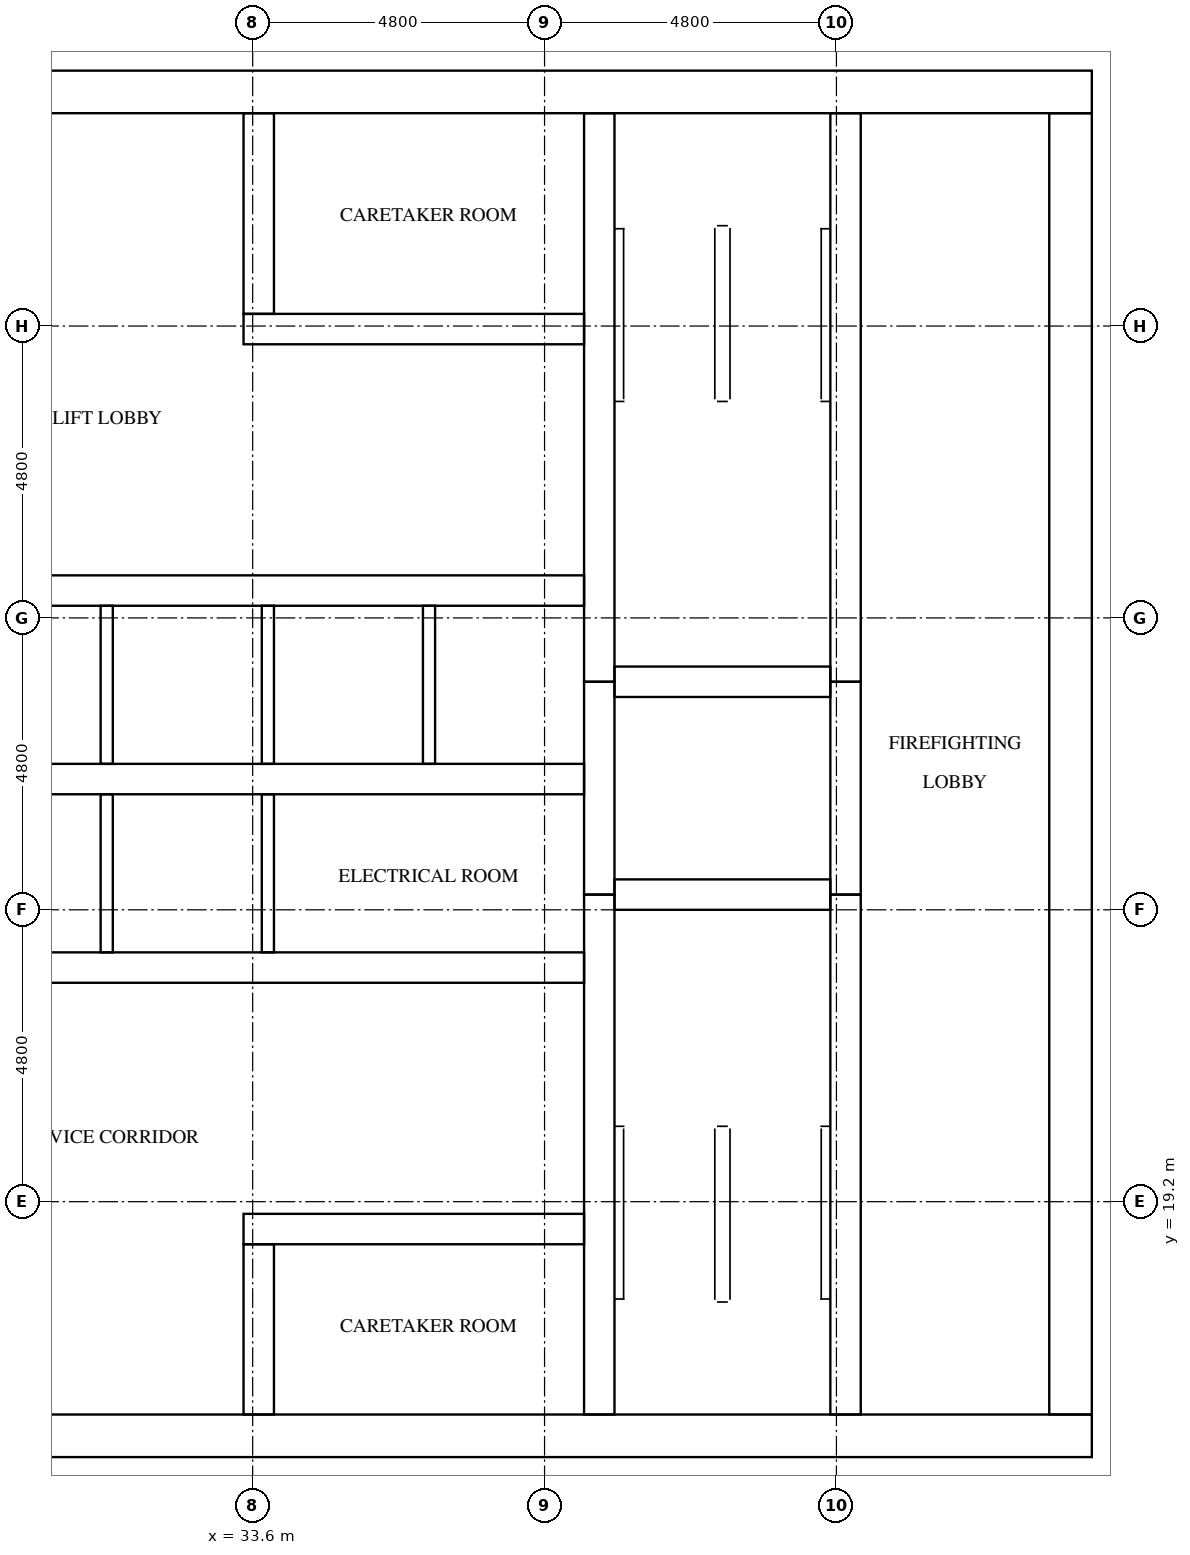
"""IFC4 building model, lengths in metres.
Left out: names, types, materials, properties, quantities, classifications, styles, units other than length and angle.
Written with IfcOpenShell. Run it as: python <this file> out.ifc"""

import sys

from ifc_helpers import new_model, si_unit, direction, frame, frame_2d, origin, place, context, subcontext, project, spatial, rectangle, extrude, element, fill, save


model = new_model("IFC4")
c1 = context("Model", 3, precision=1e-05, world=origin(), true_north=direction((0.0, 1.0)))
c2 = subcontext(c1, "Body", "Model", "MODEL_VIEW")
j1 = project(units=[si_unit("LENGTHUNIT", "METRE"), si_unit("PLANEANGLEUNIT", "RADIAN")], contexts=[c1])
p1 = place(None, origin())
s1 = spatial("IfcSite", under=j1, at=p1, CompositionType="ELEMENT")
p2 = place(p1, origin())
s2 = spatial("IfcBuilding", under=s1, at=p2, CompositionType="ELEMENT")
p3 = place(p2, frame((0.0, 0.0, 208.8)))
s3 = spatial("IfcBuildingStorey", under=s2, at=p3, CompositionType="ELEMENT", Elevation=208.8)
p4 = place(p3, frame((15.0, 15.35, 0.0), z_axis=(0.0, 0.0, 1.0), x_axis=(1.0, 0.0, 0.0)))
e1 = element("IfcWall", 1, at=p4, inside=s3, PredefinedType="SHEAR", context=c2, shape_type="SweptSolid", body=[
    extrude(rectangle(XDim=32.4, YDim=0.7, at=frame_2d((16.2, 0.0))), origin(), (0.0, 0.0, 1.0), 3.2),
])
p5 = place(p4, frame((15.3, 0.0, 0.0)))
e2 = element("IfcOpeningElement", 2, at=p5, cuts=e1, PredefinedType="OPENING", context=c2, shape_type="SweptSolid", body=[
    extrude(rectangle(XDim=1.8, YDim=2.1, at=frame_2d((0.9, 1.05))), frame((0.0, 0.36, 0.0), z_axis=(0.0, -1.0, 0.0), x_axis=(1.0, 0.0, 0.0)), (0.0, 0.0, 1.0), 0.72),
])
p6 = place(p3, frame((15.0, 37.45, 0.0), z_axis=(0.0, 0.0, 1.0), x_axis=(1.0, 0.0, 0.0)))
e3 = element("IfcWall", 3, at=p6, inside=s3, PredefinedType="SHEAR", context=c2, shape_type="SweptSolid", body=[
    extrude(rectangle(XDim=32.4, YDim=0.7, at=frame_2d((16.2, 0.0))), origin(), (0.0, 0.0, 1.0), 3.2),
])
p7 = place(p6, frame((15.3, 0.0, 0.0)))
e4 = element("IfcOpeningElement", 4, at=p7, cuts=e3, PredefinedType="OPENING", context=c2, shape_type="SweptSolid", body=[
    extrude(rectangle(XDim=1.8, YDim=2.1, at=frame_2d((0.9, 1.05))), frame((0.0, 0.36, 0.0), z_axis=(0.0, -1.0, 0.0), x_axis=(1.0, 0.0, 0.0)), (0.0, 0.0, 1.0), 0.72),
])
p8 = place(p6, frame((1.544, 0.0, 0.0)))
e5 = element("IfcOpeningElement", 5, at=p8, cuts=e3, PredefinedType="OPENING", context=c2, shape_type="SweptSolid", body=[
    extrude(rectangle(XDim=1.0, YDim=2.1, at=frame_2d((0.5, 1.05))), frame((0.0, 0.36, 0.0), z_axis=(0.0, -1.0, 0.0), x_axis=(1.0, 0.0, 0.0)), (0.0, 0.0, 1.0), 0.72),
])
p9 = place(p6, frame((5.219, 0.0, 0.0)))
e6 = element("IfcOpeningElement", 6, at=p9, cuts=e3, PredefinedType="OPENING", context=c2, shape_type="SweptSolid", body=[
    extrude(rectangle(XDim=1.0, YDim=2.1, at=frame_2d((0.5, 1.05))), frame((0.0, 0.36, 0.0), z_axis=(0.0, -1.0, 0.0), x_axis=(1.0, 0.0, 0.0)), (0.0, 0.0, 1.0), 0.72),
])
p10 = place(p3, frame((47.05, 15.7, 0.0), z_axis=(0.0, 0.0, 1.0), x_axis=(0.0, 1.0, 0.0)))
e7 = element("IfcWall", 7, at=p10, inside=s3, PredefinedType="SHEAR", context=c2, shape_type="SweptSolid", body=[
    extrude(rectangle(XDim=21.4, YDim=0.7, at=frame_2d((10.7, 0.0))), origin(), (0.0, 0.0, 1.0), 3.2),
])
p11 = place(p10, frame((10.4, 0.0, 0.0)))
e8 = element("IfcOpeningElement", 8, at=p11, cuts=e7, PredefinedType="OPENING", context=c2, shape_type="SweptSolid", body=[
    extrude(rectangle(XDim=1.2, YDim=2.1, at=frame_2d((0.6, 1.05))), frame((0.0, 0.36, 0.0), z_axis=(0.0, -1.0, 0.0), x_axis=(1.0, 0.0, 0.0)), (0.0, 0.0, 1.0), 0.72),
])
p12 = place(p3, frame((39.3, 15.7, 0.0), z_axis=(0.0, 0.0, 1.0), x_axis=(0.0, 1.0, 0.0)))
e9 = element("IfcWall", 9, at=p12, inside=s3, PredefinedType="SHEAR", context=c2, shape_type="SweptSolid", body=[
    extrude(rectangle(XDim=8.55, YDim=0.5, at=frame_2d((4.275, 0.0))), origin(), (0.0, 0.0, 1.0), 3.2),
])
p13 = place(p3, frame((39.3, 24.25, 0.0), z_axis=(0.0, 0.0, 1.0), x_axis=(0.0, 1.0, 0.0)))
e10 = element("IfcWall", 10, at=p13, inside=s3, PredefinedType="SHEAR", context=c2, shape_type="SweptSolid", body=[
    extrude(rectangle(XDim=3.5, YDim=0.5, at=frame_2d((1.75, 0.0))), origin(), (0.0, 0.0, 1.0), 3.2),
])
p14 = place(p3, frame((39.3, 27.75, 0.0), z_axis=(0.0, 0.0, 1.0), x_axis=(0.0, 1.0, 0.0)))
e11 = element("IfcWall", 11, at=p14, inside=s3, PredefinedType="SHEAR", context=c2, shape_type="SweptSolid", body=[
    extrude(rectangle(XDim=9.35, YDim=0.5, at=frame_2d((4.675, 0.0))), origin(), (0.0, 0.0, 1.0), 3.2),
])
p15 = place(p3, frame((43.35, 15.7, 0.0), z_axis=(0.0, 0.0, 1.0), x_axis=(0.0, 1.0, 0.0)))
e12 = element("IfcWall", 12, at=p15, inside=s3, PredefinedType="SHEAR", context=c2, shape_type="SweptSolid", body=[
    extrude(rectangle(XDim=8.55, YDim=0.5, at=frame_2d((4.275, 0.0))), origin(), (0.0, 0.0, 1.0), 3.2),
])
p16 = place(p15, frame((0.5, 0.0, 0.0)))
e13 = element("IfcOpeningElement", 13, at=p16, cuts=e12, PredefinedType="OPENING", context=c2, shape_type="SweptSolid", body=[
    extrude(rectangle(XDim=1.2, YDim=2.1, at=frame_2d((0.6, 1.05))), frame((0.0, 0.26, 0.0), z_axis=(0.0, -1.0, 0.0), x_axis=(1.0, 0.0, 0.0)), (0.0, 0.0, 1.0), 0.52),
])
p17 = place(p3, frame((43.35, 24.25, 0.0), z_axis=(0.0, 0.0, 1.0), x_axis=(0.0, 1.0, 0.0)))
e14 = element("IfcWall", 14, at=p17, inside=s3, PredefinedType="SHEAR", context=c2, shape_type="SweptSolid", body=[
    extrude(rectangle(XDim=3.5, YDim=0.5, at=frame_2d((1.75, 0.0))), origin(), (0.0, 0.0, 1.0), 3.2),
])
p18 = place(p17, frame((1.2, 0.0, 0.0)))
e15 = element("IfcOpeningElement", 15, at=p18, cuts=e14, PredefinedType="OPENING", context=c2, shape_type="SweptSolid", body=[
    extrude(rectangle(XDim=1.1, YDim=2.1, at=frame_2d((0.55, 1.05))), frame((0.0, 0.26, 0.0), z_axis=(0.0, -1.0, 0.0), x_axis=(1.0, 0.0, 0.0)), (0.0, 0.0, 1.0), 0.52),
])
p19 = place(p3, frame((43.35, 27.75, 0.0), z_axis=(0.0, 0.0, 1.0), x_axis=(0.0, 1.0, 0.0)))
e16 = element("IfcWall", 16, at=p19, inside=s3, PredefinedType="SHEAR", context=c2, shape_type="SweptSolid", body=[
    extrude(rectangle(XDim=9.35, YDim=0.5, at=frame_2d((4.675, 0.0))), origin(), (0.0, 0.0, 1.0), 3.2),
])
p20 = place(p19, frame((7.65, 0.0, 0.0)))
e17 = element("IfcOpeningElement", 17, at=p20, cuts=e16, PredefinedType="OPENING", context=c2, shape_type="SweptSolid", body=[
    extrude(rectangle(XDim=1.2, YDim=2.1, at=frame_2d((0.6, 1.05))), frame((0.0, 0.26, 0.0), z_axis=(0.0, -1.0, 0.0), x_axis=(1.0, 0.0, 0.0)), (0.0, 0.0, 1.0), 0.52),
])
for number, where, z_axis, x_axis in (
    (18, (39.55, 24.25, 0.0), (0.0, 0.0, 1.0), (1.0, 0.0, 0.0)),
    (19, (39.55, 27.75, 0.0), (0.0, 0.0, 1.0), (1.0, 0.0, 0.0)),
):
    element("IfcWall", number, at=place(p3, frame(where, z_axis=z_axis, x_axis=x_axis)), inside=s3, PredefinedType="SHEAR", context=c2, shape_type="SweptSolid", body=[
        extrude(rectangle(XDim=3.55, YDim=0.5, at=frame_2d((1.775, 0.0))), origin(), (0.0, 0.0, 1.0), 3.2),
    ])
p21 = place(p3, frame((33.45, 18.75, 0.0), z_axis=(0.0, 0.0, 1.0), x_axis=(1.0, 0.0, 0.0)))
e20 = element("IfcWall", 20, at=p21, inside=s3, PredefinedType="SHEAR", context=c2, shape_type="SweptSolid", body=[
    extrude(rectangle(XDim=5.6, YDim=0.5, at=frame_2d((2.8, 0.0))), origin(), (0.0, 0.0, 1.0), 3.2),
])
p22 = place(p21, frame((2.55, 0.0, 0.0)))
e21 = element("IfcOpeningElement", 21, at=p22, cuts=e20, PredefinedType="OPENING", context=c2, shape_type="SweptSolid", body=[
    extrude(rectangle(XDim=1.0, YDim=2.1, at=frame_2d((0.5, 1.05))), frame((0.0, 0.26, 0.0), z_axis=(0.0, -1.0, 0.0), x_axis=(1.0, 0.0, 0.0)), (0.0, 0.0, 1.0), 0.52),
])
p23 = place(p3, frame((23.35, 23.05, 0.0), z_axis=(0.0, 0.0, 1.0), x_axis=(1.0, 0.0, 0.0)))
e22 = element("IfcWall", 22, at=p23, inside=s3, PredefinedType="SHEAR", context=c2, shape_type="SweptSolid", body=[
    extrude(rectangle(XDim=15.7, YDim=0.5, at=frame_2d((7.85, 0.0))), origin(), (0.0, 0.0, 1.0), 3.2),
])
p24 = place(p23, frame((2.05, 0.0, 0.0)))
e23 = element("IfcOpeningElement", 23, at=p24, cuts=e22, PredefinedType="OPENING", context=c2, shape_type="SweptSolid", body=[
    extrude(rectangle(XDim=1.0, YDim=2.1, at=frame_2d((0.5, 1.05))), frame((0.0, 0.26, 0.0), z_axis=(0.0, -1.0, 0.0), x_axis=(1.0, 0.0, 0.0)), (0.0, 0.0, 1.0), 0.52),
])
p25 = place(p23, frame((12.65, 0.0, 0.0)))
e24 = element("IfcOpeningElement", 24, at=p25, cuts=e22, PredefinedType="OPENING", context=c2, shape_type="SweptSolid", body=[
    extrude(rectangle(XDim=1.0, YDim=2.1, at=frame_2d((0.5, 1.05))), frame((0.0, 0.26, 0.0), z_axis=(0.0, -1.0, 0.0), x_axis=(1.0, 0.0, 0.0)), (0.0, 0.0, 1.0), 0.52),
])
p26 = place(p3, frame((23.35, 26.15, 0.0), z_axis=(0.0, 0.0, 1.0), x_axis=(1.0, 0.0, 0.0)))
e25 = element("IfcWall", 25, at=p26, inside=s3, PredefinedType="SHEAR", context=c2, shape_type="SweptSolid", body=[
    extrude(rectangle(XDim=15.7, YDim=0.5, at=frame_2d((7.85, 0.0))), origin(), (0.0, 0.0, 1.0), 3.2),
])
p27 = place(p3, frame((23.35, 29.25, 0.0), z_axis=(0.0, 0.0, 1.0), x_axis=(1.0, 0.0, 0.0)))
e26 = element("IfcWall", 26, at=p27, inside=s3, PredefinedType="SHEAR", context=c2, shape_type="SweptSolid", body=[
    extrude(rectangle(XDim=15.7, YDim=0.5, at=frame_2d((7.85, 0.0))), origin(), (0.0, 0.0, 1.0), 3.2),
])
p28 = place(p27, frame((0.675, 0.0, 0.0)))
e27 = element("IfcOpeningElement", 27, at=p28, cuts=e26, PredefinedType="OPENING", context=c2, shape_type="SweptSolid", body=[
    extrude(rectangle(XDim=1.1, YDim=2.1, at=frame_2d((0.55, 1.05))), frame((0.0, 0.26, 0.0), z_axis=(0.0, -1.0, 0.0), x_axis=(1.0, 0.0, 0.0)), (0.0, 0.0, 1.0), 0.52),
])
p29 = place(p27, frame((3.325, 0.0, 0.0)))
e28 = element("IfcOpeningElement", 28, at=p29, cuts=e26, PredefinedType="OPENING", context=c2, shape_type="SweptSolid", body=[
    extrude(rectangle(XDim=1.1, YDim=2.1, at=frame_2d((0.55, 1.05))), frame((0.0, 0.26, 0.0), z_axis=(0.0, -1.0, 0.0), x_axis=(1.0, 0.0, 0.0)), (0.0, 0.0, 1.0), 0.52),
])
p30 = place(p27, frame((5.975, 0.0, 0.0)))
e29 = element("IfcOpeningElement", 29, at=p30, cuts=e26, PredefinedType="OPENING", context=c2, shape_type="SweptSolid", body=[
    extrude(rectangle(XDim=1.1, YDim=2.1, at=frame_2d((0.55, 1.05))), frame((0.0, 0.26, 0.0), z_axis=(0.0, -1.0, 0.0), x_axis=(1.0, 0.0, 0.0)), (0.0, 0.0, 1.0), 0.52),
])
p31 = place(p27, frame((8.625, 0.0, 0.0)))
e30 = element("IfcOpeningElement", 30, at=p31, cuts=e26, PredefinedType="OPENING", context=c2, shape_type="SweptSolid", body=[
    extrude(rectangle(XDim=1.1, YDim=2.1, at=frame_2d((0.55, 1.05))), frame((0.0, 0.26, 0.0), z_axis=(0.0, -1.0, 0.0), x_axis=(1.0, 0.0, 0.0)), (0.0, 0.0, 1.0), 0.52),
])
p32 = place(p27, frame((11.275, 0.0, 0.0)))
e31 = element("IfcOpeningElement", 31, at=p32, cuts=e26, PredefinedType="OPENING", context=c2, shape_type="SweptSolid", body=[
    extrude(rectangle(XDim=1.1, YDim=2.1, at=frame_2d((0.55, 1.05))), frame((0.0, 0.26, 0.0), z_axis=(0.0, -1.0, 0.0), x_axis=(1.0, 0.0, 0.0)), (0.0, 0.0, 1.0), 0.52),
])
p33 = place(p27, frame((13.925, 0.0, 0.0)))
e32 = element("IfcOpeningElement", 32, at=p33, cuts=e26, PredefinedType="OPENING", context=c2, shape_type="SweptSolid", body=[
    extrude(rectangle(XDim=1.1, YDim=2.1, at=frame_2d((0.55, 1.05))), frame((0.0, 0.26, 0.0), z_axis=(0.0, -1.0, 0.0), x_axis=(1.0, 0.0, 0.0)), (0.0, 0.0, 1.0), 0.52),
])
p34 = place(p3, frame((33.45, 33.55, 0.0), z_axis=(0.0, 0.0, 1.0), x_axis=(1.0, 0.0, 0.0)))
e33 = element("IfcWall", 33, at=p34, inside=s3, PredefinedType="SHEAR", context=c2, shape_type="SweptSolid", body=[
    extrude(rectangle(XDim=5.6, YDim=0.5, at=frame_2d((2.8, 0.0))), origin(), (0.0, 0.0, 1.0), 3.2),
])
p35 = place(p34, frame((2.55, 0.0, 0.0)))
e34 = element("IfcOpeningElement", 34, at=p35, cuts=e33, PredefinedType="OPENING", context=c2, shape_type="SweptSolid", body=[
    extrude(rectangle(XDim=1.0, YDim=2.1, at=frame_2d((0.5, 1.05))), frame((0.0, 0.26, 0.0), z_axis=(0.0, -1.0, 0.0), x_axis=(1.0, 0.0, 0.0)), (0.0, 0.0, 1.0), 0.52),
])
p36 = place(p3, frame((33.7, 15.7, 0.0), z_axis=(0.0, 0.0, 1.0), x_axis=(0.0, 1.0, 0.0)))
e35 = element("IfcWall", 35, at=p36, inside=s3, PredefinedType="SHEAR", context=c2, shape_type="SweptSolid", body=[
    extrude(rectangle(XDim=2.8, YDim=0.5, at=frame_2d((1.4, 0.0))), origin(), (0.0, 0.0, 1.0), 3.2),
])
p37 = place(p3, frame((33.7, 33.8, 0.0), z_axis=(0.0, 0.0, 1.0), x_axis=(0.0, 1.0, 0.0)))
e36 = element("IfcWall", 36, at=p37, inside=s3, PredefinedType="SHEAR", context=c2, shape_type="SweptSolid", body=[
    extrude(rectangle(XDim=3.3, YDim=0.5, at=frame_2d((1.65, 0.0))), origin(), (0.0, 0.0, 1.0), 3.2),
])
p38 = place(p3, frame((31.2, 23.3, 0.0), z_axis=(0.0, 0.0, 1.0), x_axis=(0.0, 1.0, 0.0)))
e37 = element("IfcWall", 37, at=p38, inside=s3, PredefinedType="SOLIDWALL", context=c2, shape_type="SweptSolid", body=[
    extrude(rectangle(XDim=2.6, YDim=0.2, at=frame_2d((1.3, 0.0))), origin(), (0.0, 0.0, 1.0), 3.2),
])
p39 = place(p3, frame((31.2, 26.4, 0.0), z_axis=(0.0, 0.0, 1.0), x_axis=(0.0, 1.0, 0.0)))
e38 = element("IfcWall", 38, at=p39, inside=s3, PredefinedType="SOLIDWALL", context=c2, shape_type="SweptSolid", body=[
    extrude(rectangle(XDim=2.6, YDim=0.2, at=frame_2d((1.3, 0.0))), origin(), (0.0, 0.0, 1.0), 3.2),
])
p40 = place(p3, frame((33.85, 23.3, 0.0), z_axis=(0.0, 0.0, 1.0), x_axis=(0.0, 1.0, 0.0)))
e39 = element("IfcWall", 39, at=p40, inside=s3, PredefinedType="SOLIDWALL", context=c2, shape_type="SweptSolid", body=[
    extrude(rectangle(XDim=2.6, YDim=0.2, at=frame_2d((1.3, 0.0))), origin(), (0.0, 0.0, 1.0), 3.2),
])
for number, where, z_axis, x_axis in (
    (40, (33.85, 26.4, 0.0), (0.0, 0.0, 1.0), (0.0, 1.0, 0.0)),
    (41, (36.5, 26.4, 0.0), (0.0, 0.0, 1.0), (0.0, 1.0, 0.0)),
):
    element("IfcWall", number, at=place(p3, frame(where, z_axis=z_axis, x_axis=x_axis)), inside=s3, PredefinedType="SOLIDWALL", context=c2, shape_type="SweptSolid", body=[
        extrude(rectangle(XDim=2.6, YDim=0.2, at=frame_2d((1.3, 0.0))), origin(), (0.0, 0.0, 1.0), 3.2),
    ])
p41 = place(p30, origin())
e42 = element("IfcDoor", 42, at=p41, inside=s3, OperationType="DOUBLE_DOOR_SLIDING", PredefinedType="DOOR", context=c2, shape_type="SweptSolid", body=[
    extrude(rectangle(XDim=1.1, YDim=2.1, at=frame_2d((0.55, 1.05))), frame((0.0, 0.025, 0.0), z_axis=(0.0, -1.0, 0.0), x_axis=(1.0, 0.0, 0.0)), (0.0, 0.0, 1.0), 0.05),
])
fill(e29, e42)
p42 = place(p31, origin())
e43 = element("IfcDoor", 43, at=p42, inside=s3, OperationType="DOUBLE_DOOR_SLIDING", PredefinedType="DOOR", context=c2, shape_type="SweptSolid", body=[
    extrude(rectangle(XDim=1.1, YDim=2.1, at=frame_2d((0.55, 1.05))), frame((0.0, 0.025, 0.0), z_axis=(0.0, -1.0, 0.0), x_axis=(1.0, 0.0, 0.0)), (0.0, 0.0, 1.0), 0.05),
])
fill(e30, e43)
p43 = place(p32, origin())
e44 = element("IfcDoor", 44, at=p43, inside=s3, OperationType="DOUBLE_DOOR_SLIDING", PredefinedType="DOOR", context=c2, shape_type="SweptSolid", body=[
    extrude(rectangle(XDim=1.1, YDim=2.1, at=frame_2d((0.55, 1.05))), frame((0.0, 0.025, 0.0), z_axis=(0.0, -1.0, 0.0), x_axis=(1.0, 0.0, 0.0)), (0.0, 0.0, 1.0), 0.05),
])
fill(e31, e44)
p44 = place(p33, origin())
e45 = element("IfcDoor", 45, at=p44, inside=s3, OperationType="DOUBLE_DOOR_SLIDING", PredefinedType="DOOR", context=c2, shape_type="SweptSolid", body=[
    extrude(rectangle(XDim=1.1, YDim=2.1, at=frame_2d((0.55, 1.05))), frame((0.0, 0.025, 0.0), z_axis=(0.0, -1.0, 0.0), x_axis=(1.0, 0.0, 0.0)), (0.0, 0.0, 1.0), 0.05),
])
fill(e32, e45)
p45 = place(p18, origin())
e46 = element("IfcDoor", 46, at=p45, inside=s3, OperationType="DOUBLE_DOOR_SLIDING", PredefinedType="DOOR", context=c2, shape_type="SweptSolid", body=[
    extrude(rectangle(XDim=1.1, YDim=2.1, at=frame_2d((0.55, 1.05))), frame((0.0, 0.025, 0.0), z_axis=(0.0, -1.0, 0.0), x_axis=(1.0, 0.0, 0.0)), (0.0, 0.0, 1.0), 0.05),
])
fill(e15, e46)
p46 = place(p16, origin())
e47 = element("IfcDoor", 47, at=p46, inside=s3, OperationType="SINGLE_SWING_LEFT", PredefinedType="DOOR", context=c2, shape_type="SweptSolid", body=[
    extrude(rectangle(XDim=1.2, YDim=2.1, at=frame_2d((0.6, 1.05))), frame((0.0, 0.025, 0.0), z_axis=(0.0, -1.0, 0.0), x_axis=(1.0, 0.0, 0.0)), (0.0, 0.0, 1.0), 0.05),
])
fill(e13, e47)
p47 = place(p20, origin())
e48 = element("IfcDoor", 48, at=p47, inside=s3, OperationType="SINGLE_SWING_RIGHT", PredefinedType="DOOR", context=c2, shape_type="SweptSolid", body=[
    extrude(rectangle(XDim=1.2, YDim=2.1, at=frame_2d((0.6, 1.05))), frame((0.0, 0.025, 0.0), z_axis=(0.0, -1.0, 0.0), x_axis=(1.0, 0.0, 0.0)), (0.0, 0.0, 1.0), 0.05),
])
fill(e17, e48)
p48 = place(p5, frame((1.8, 0.0, 0.0), z_axis=(0.0, 0.0, 1.0), x_axis=(-1.0, 0.0, 0.0)))
e49 = element("IfcDoor", 49, at=p48, inside=s3, OperationType="DOUBLE_DOOR_SINGLE_SWING", PredefinedType="DOOR", context=c2, shape_type="SweptSolid", body=[
    extrude(rectangle(XDim=1.8, YDim=2.1, at=frame_2d((0.9, 1.05))), frame((0.0, 0.025, 0.0), z_axis=(0.0, -1.0, 0.0), x_axis=(1.0, 0.0, 0.0)), (0.0, 0.0, 1.0), 0.05),
])
fill(e2, e49)
p49 = place(p7, origin())
e50 = element("IfcDoor", 50, at=p49, inside=s3, OperationType="DOUBLE_DOOR_SINGLE_SWING", PredefinedType="DOOR", context=c2, shape_type="SweptSolid", body=[
    extrude(rectangle(XDim=1.8, YDim=2.1, at=frame_2d((0.9, 1.05))), frame((0.0, 0.025, 0.0), z_axis=(0.0, -1.0, 0.0), x_axis=(1.0, 0.0, 0.0)), (0.0, 0.0, 1.0), 0.05),
])
fill(e4, e50)
p50 = place(p11, origin())
e51 = element("IfcDoor", 51, at=p50, inside=s3, OperationType="SINGLE_SWING_RIGHT", PredefinedType="DOOR", context=c2, shape_type="SweptSolid", body=[
    extrude(rectangle(XDim=1.2, YDim=2.1, at=frame_2d((0.6, 1.05))), frame((0.0, 0.025, 0.0), z_axis=(0.0, -1.0, 0.0), x_axis=(1.0, 0.0, 0.0)), (0.0, 0.0, 1.0), 0.05),
])
fill(e8, e51)
p51 = place(p25, frame((1.0, 0.0, 0.0), z_axis=(0.0, 0.0, 1.0), x_axis=(-1.0, 0.0, 0.0)))
e52 = element("IfcDoor", 52, at=p51, inside=s3, OperationType="SINGLE_SWING_RIGHT", PredefinedType="DOOR", context=c2, shape_type="SweptSolid", body=[
    extrude(rectangle(XDim=1.0, YDim=2.1, at=frame_2d((0.5, 1.05))), frame((0.0, 0.025, 0.0), z_axis=(0.0, -1.0, 0.0), x_axis=(1.0, 0.0, 0.0)), (0.0, 0.0, 1.0), 0.05),
])
fill(e24, e52)
p52 = place(p22, origin())
e53 = element("IfcDoor", 53, at=p52, inside=s3, OperationType="SINGLE_SWING_RIGHT", PredefinedType="DOOR", context=c2, shape_type="SweptSolid", body=[
    extrude(rectangle(XDim=1.0, YDim=2.1, at=frame_2d((0.5, 1.05))), frame((0.0, 0.025, 0.0), z_axis=(0.0, -1.0, 0.0), x_axis=(1.0, 0.0, 0.0)), (0.0, 0.0, 1.0), 0.05),
])
fill(e21, e53)
p53 = place(p35, frame((1.0, 0.0, 0.0), z_axis=(0.0, 0.0, 1.0), x_axis=(-1.0, 0.0, 0.0)))
e54 = element("IfcDoor", 54, at=p53, inside=s3, OperationType="SINGLE_SWING_RIGHT", PredefinedType="DOOR", context=c2, shape_type="SweptSolid", body=[
    extrude(rectangle(XDim=1.0, YDim=2.1, at=frame_2d((0.5, 1.05))), frame((0.0, 0.025, 0.0), z_axis=(0.0, -1.0, 0.0), x_axis=(1.0, 0.0, 0.0)), (0.0, 0.0, 1.0), 0.05),
])
fill(e34, e54)
save(model, sys.argv[1])
